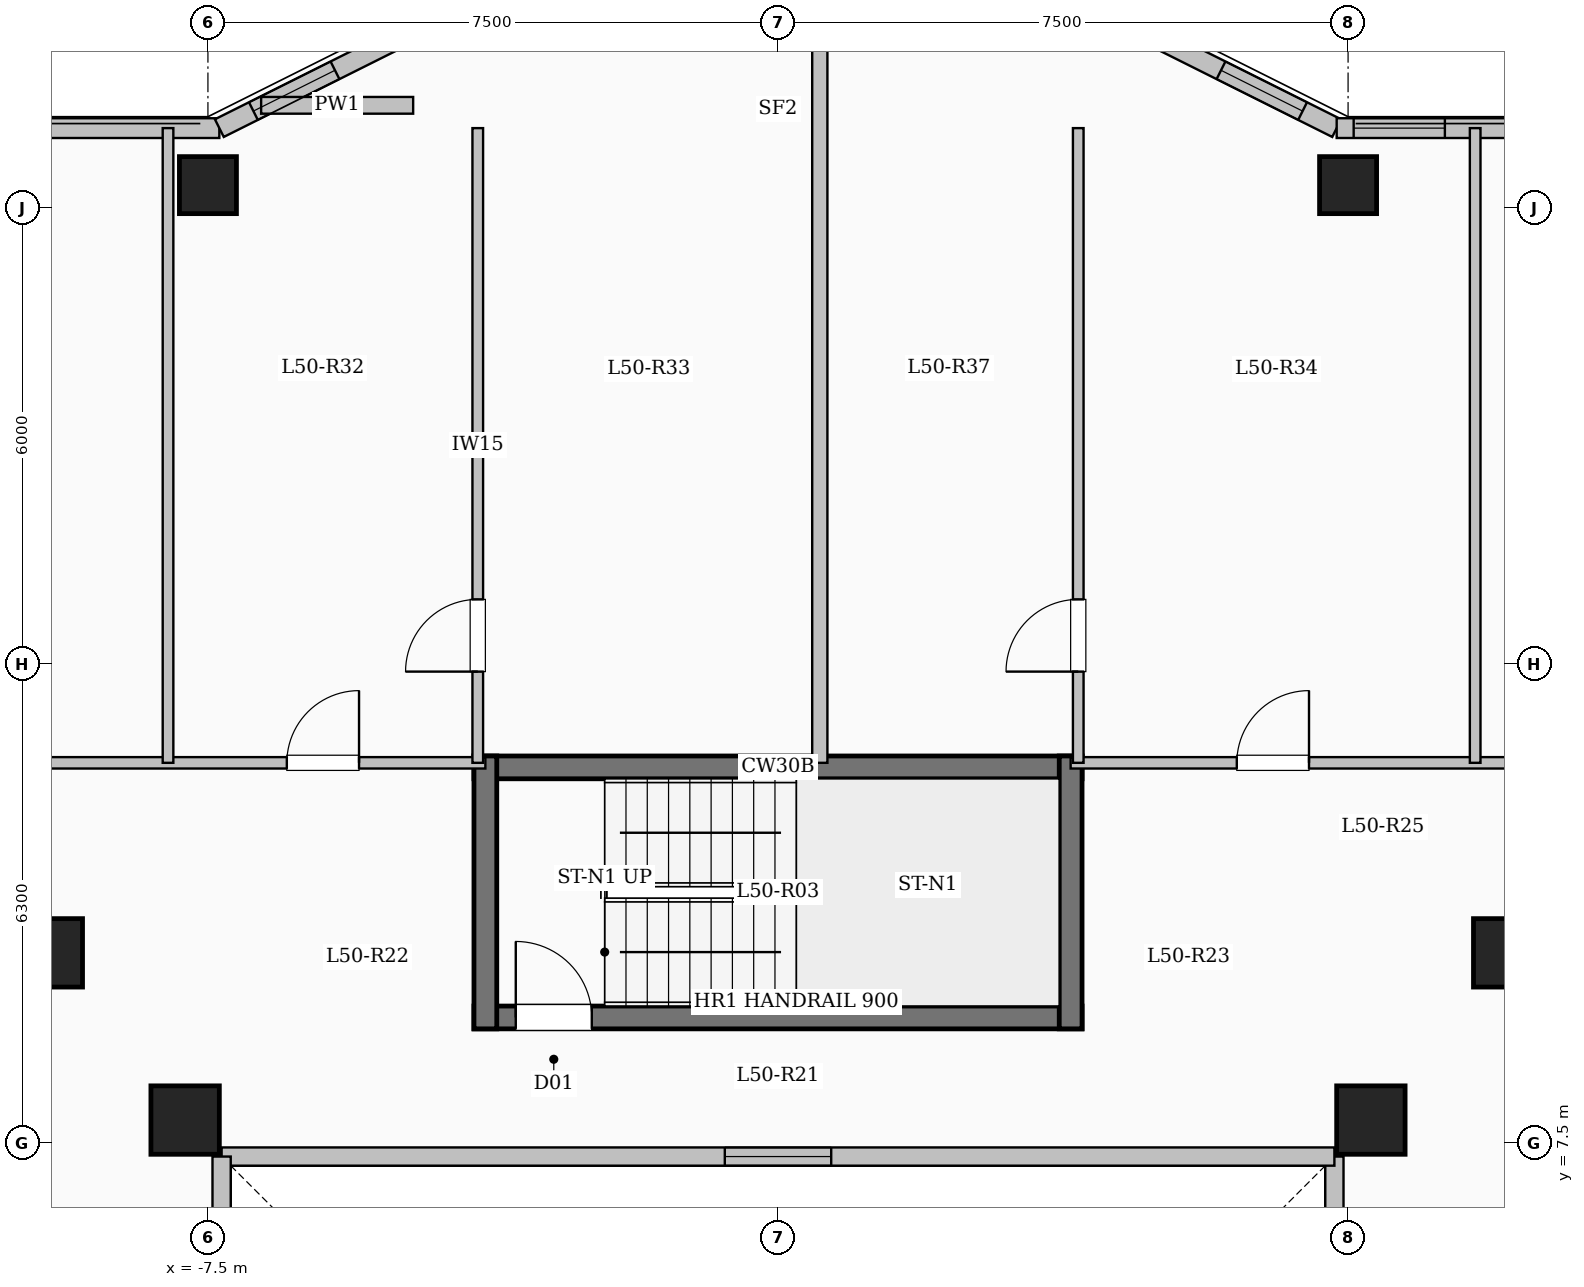
"""IFC4 building model, lengths in metres.
Left out: names, types, materials, properties, quantities, classifications, styles, units other than length and angle.
Written with IfcOpenShell. Run it as: python <this file> out.ifc"""

import sys

from ifc_helpers import new_model, si_unit, direction, frame, frame_2d, origin, origin_2d, place, context, subcontext, project, spatial, rectangle, extrude, element, fill, save


model = new_model("IFC4")
c1 = context("Model", 3, precision=1e-05, world=origin(), true_north=direction((0.0, 1.0)))
c2 = subcontext(c1, "Body", "Model", "MODEL_VIEW")
j1 = project(units=[si_unit("LENGTHUNIT", "METRE"), si_unit("PLANEANGLEUNIT", "RADIAN")], contexts=[c1])
p1 = place(None, origin())
s1 = spatial("IfcSite", under=j1, at=p1, CompositionType="ELEMENT")
p2 = place(p1, origin())
s2 = spatial("IfcBuilding", under=s1, at=p2, CompositionType="ELEMENT")
p3 = place(p2, frame((0.0, 0.0, 186.9)))
s3 = spatial("IfcBuildingStorey", under=s2, at=p3, CompositionType="ELEMENT", Elevation=186.9)
for number, where, z_axis, x_axis in (
    (1, (-7.8, 7.8, 0.0), (0.0, 0.0, 1.0), (1.0, 0.0, 0.0)),
    (2, (7.8, 7.8, 0.0), (0.0, 0.0, 1.0), (1.0, 0.0, 0.0)),
    (3, (-9.6, 10.0, 0.0), (0.0, 0.0, 1.0), (1.0, 0.0, 0.0)),
    (4, (9.6, 10.0, 0.0), (0.0, 0.0, 1.0), (1.0, 0.0, 0.0)),
):
    element("IfcColumn", number, at=place(p3, frame(where, z_axis=z_axis, x_axis=x_axis)), inside=s3, PredefinedType="COLUMN", context=c2, shape_type="SweptSolid", body=[
        extrude(rectangle(XDim=0.9, YDim=0.9, at=origin_2d()), origin(), (0.0, 0.0, 1.0), 3.35),
    ])
for number, where, z_axis, x_axis in (
    (5, (-7.5, 20.1, 0.0), (0.0, 0.0, 1.0), (1.0, 0.0, 0.0)),
    (6, (7.5, 20.1, 0.0), (0.0, 0.0, 1.0), (1.0, 0.0, 0.0)),
):
    element("IfcColumn", number, at=place(p3, frame(where, z_axis=z_axis, x_axis=x_axis)), inside=s3, PredefinedType="COLUMN", context=c2, shape_type="SweptSolid", body=[
        extrude(rectangle(XDim=0.75, YDim=0.75, at=origin_2d()), origin(), (0.0, 0.0, 1.0), 3.35),
    ])
p4 = place(p3, frame((7.32, -7.32, 0.0), z_axis=(0.0, 0.0, 1.0), x_axis=(0.0, 1.0, 0.0)))
e7 = element("IfcWall", 7, at=p4, inside=s3, PredefinedType="SOLIDWALL", context=c2, shape_type="SweptSolid", body=[
    extrude(rectangle(XDim=14.64, YDim=0.24, at=frame_2d((7.32, 0.0))), origin(), (0.0, 0.0, 1.0), 3.1),
])
p5 = place(p4, frame((6.62, 0.0, 0.95)))
e8 = element("IfcOpeningElement", 8, at=p5, cuts=e7, PredefinedType="OPENING", context=c2, shape_type="SweptSolid", body=[
    extrude(rectangle(XDim=1.4, YDim=1.5, at=frame_2d((0.7, 0.75))), frame((0.0, 0.13, 0.0), z_axis=(0.0, -1.0, 0.0), x_axis=(1.0, 0.0, 0.0)), (0.0, 0.0, 1.0), 0.26),
])
p6 = place(p3, frame((7.32, 7.32, 0.0), z_axis=(0.0, 0.0, 1.0), x_axis=(-1.0, 0.0, 0.0)))
e9 = element("IfcWall", 9, at=p6, inside=s3, PredefinedType="SOLIDWALL", context=c2, shape_type="SweptSolid", body=[
    extrude(rectangle(XDim=14.64, YDim=0.24, at=frame_2d((7.32, 0.0))), origin(), (0.0, 0.0, 1.0), 3.1),
])
p7 = place(p6, frame((6.62, 0.0, 0.95)))
e10 = element("IfcOpeningElement", 10, at=p7, cuts=e9, PredefinedType="OPENING", context=c2, shape_type="SweptSolid", body=[
    extrude(rectangle(XDim=1.4, YDim=1.5, at=frame_2d((0.7, 0.75))), frame((0.0, 0.13, 0.0), z_axis=(0.0, -1.0, 0.0), x_axis=(1.0, 0.0, 0.0)), (0.0, 0.0, 1.0), 0.26),
])
p8 = place(p3, frame((-7.32, 7.32, 0.0), z_axis=(0.0, 0.0, 1.0), x_axis=(0.0, -1.0, 0.0)))
e11 = element("IfcWall", 11, at=p8, inside=s3, PredefinedType="SOLIDWALL", context=c2, shape_type="SweptSolid", body=[
    extrude(rectangle(XDim=14.64, YDim=0.24, at=frame_2d((7.32, 0.0))), origin(), (0.0, 0.0, 1.0), 3.1),
])
p9 = place(p8, frame((6.62, 0.0, 0.95)))
e12 = element("IfcOpeningElement", 12, at=p9, cuts=e11, PredefinedType="OPENING", context=c2, shape_type="SweptSolid", body=[
    extrude(rectangle(XDim=1.4, YDim=1.5, at=frame_2d((0.7, 0.75))), frame((0.0, 0.13, 0.0), z_axis=(0.0, -1.0, 0.0), x_axis=(1.0, 0.0, 0.0)), (0.0, 0.0, 1.0), 0.26),
])
p10 = place(p3, frame((-18.45, 20.85, 0.0), z_axis=(0.0, 0.0, 1.0), x_axis=(1.0, 0.0, 0.0)))
e13 = element("IfcWall", 13, at=p10, inside=s3, PredefinedType="SOLIDWALL", context=c2, shape_type="SweptSolid", body=[
    extrude(rectangle(XDim=11.1, YDim=0.26, at=frame_2d((5.55, 0.0))), origin(), (0.0, 0.0, 1.0), 3.1),
])
p11 = place(p10, frame((1.637, 0.0, 0.9)))
e14 = element("IfcOpeningElement", 14, at=p11, cuts=e13, PredefinedType="OPENING", context=c2, shape_type="SweptSolid", body=[
    extrude(rectangle(XDim=2.0, YDim=1.7, at=frame_2d((1.0, 0.85))), frame((0.0, 0.14, 0.0), z_axis=(0.0, -1.0, 0.0), x_axis=(1.0, 0.0, 0.0)), (0.0, 0.0, 1.0), 0.28),
])
p12 = place(p10, frame((6.835, 0.0, 0.9)))
e15 = element("IfcOpeningElement", 15, at=p12, cuts=e13, PredefinedType="OPENING", context=c2, shape_type="SweptSolid", body=[
    extrude(rectangle(XDim=2.0, YDim=1.7, at=frame_2d((1.0, 0.85))), frame((0.0, 0.14, 0.0), z_axis=(0.0, -1.0, 0.0), x_axis=(1.0, 0.0, 0.0)), (0.0, 0.0, 1.0), 0.28),
])
p13 = place(p3, frame((-7.35, 20.85, 0.0), z_axis=(0.0, 0.0, 1.0), x_axis=(0.894427191, 0.4472135955, 0.0)))
e16 = element("IfcWall", 16, at=p13, inside=s3, PredefinedType="SOLIDWALL", context=c2, shape_type="SweptSolid", body=[
    extrude(rectangle(XDim=3.354, YDim=0.26, at=frame_2d((1.677, 0.0))), origin(), (0.0, 0.0, 1.0), 3.1),
])
p14 = place(p13, frame((0.501, 0.0, 0.95)))
e17 = element("IfcOpeningElement", 17, at=p14, cuts=e16, PredefinedType="OPENING", context=c2, shape_type="SweptSolid", body=[
    extrude(rectangle(XDim=1.2, YDim=1.5, at=frame_2d((0.6, 0.75))), frame((0.0, 0.14, 0.0), z_axis=(0.0, -1.0, 0.0), x_axis=(1.0, 0.0, 0.0)), (0.0, 0.0, 1.0), 0.28),
])
p15 = place(p3, frame((4.35, 22.35, 0.0), z_axis=(0.0, 0.0, 1.0), x_axis=(0.894427191, -0.4472135955, 0.0)))
e18 = element("IfcWall", 18, at=p15, inside=s3, PredefinedType="SOLIDWALL", context=c2, shape_type="SweptSolid", body=[
    extrude(rectangle(XDim=3.354, YDim=0.26, at=frame_2d((1.677, 0.0))), origin(), (0.0, 0.0, 1.0), 3.1),
])
p16 = place(p15, frame((1.653, 0.0, 0.95)))
e19 = element("IfcOpeningElement", 19, at=p16, cuts=e18, PredefinedType="OPENING", context=c2, shape_type="SweptSolid", body=[
    extrude(rectangle(XDim=1.2, YDim=1.5, at=frame_2d((0.6, 0.75))), frame((0.0, 0.14, 0.0), z_axis=(0.0, -1.0, 0.0), x_axis=(1.0, 0.0, 0.0)), (0.0, 0.0, 1.0), 0.28),
])
p17 = place(p3, frame((7.35, 20.85, 0.0), z_axis=(0.0, 0.0, 1.0), x_axis=(1.0, 0.0, 0.0)))
e20 = element("IfcWall", 20, at=p17, inside=s3, PredefinedType="SOLIDWALL", context=c2, shape_type="SweptSolid", body=[
    extrude(rectangle(XDim=11.1, YDim=0.26, at=frame_2d((5.55, 0.0))), origin(), (0.0, 0.0, 1.0), 3.1),
])
p18 = place(p17, frame((0.223, 0.0, 0.95)))
e21 = element("IfcOpeningElement", 21, at=p18, cuts=e20, PredefinedType="OPENING", context=c2, shape_type="SweptSolid", body=[
    extrude(rectangle(XDim=1.2, YDim=1.5, at=frame_2d((0.6, 0.75))), frame((0.0, 0.14, 0.0), z_axis=(0.0, -1.0, 0.0), x_axis=(1.0, 0.0, 0.0)), (0.0, 0.0, 1.0), 0.28),
])
p19 = place(p17, frame((3.42, 0.0, 0.9)))
e22 = element("IfcOpeningElement", 22, at=p19, cuts=e20, PredefinedType="OPENING", context=c2, shape_type="SweptSolid", body=[
    extrude(rectangle(XDim=2.0, YDim=1.7, at=frame_2d((1.0, 0.85))), frame((0.0, 0.14, 0.0), z_axis=(0.0, -1.0, 0.0), x_axis=(1.0, 0.0, 0.0)), (0.0, 0.0, 1.0), 0.28),
])
p20 = place(p17, frame((8.041, 0.0, 0.9)))
e23 = element("IfcOpeningElement", 23, at=p20, cuts=e20, PredefinedType="OPENING", context=c2, shape_type="SweptSolid", body=[
    extrude(rectangle(XDim=2.0, YDim=1.7, at=frame_2d((1.0, 0.85))), frame((0.0, 0.14, 0.0), z_axis=(0.0, -1.0, 0.0), x_axis=(1.0, 0.0, 0.0)), (0.0, 0.0, 1.0), 0.28),
])
p21 = place(p3, frame((-6.8, 21.15, 0.0), z_axis=(0.0, 0.0, 1.0), x_axis=(1.0, 0.0, 0.0)))
e24 = element("IfcWall", 24, at=p21, inside=s3, PredefinedType="PARAPET", context=c2, shape_type="SweptSolid", body=[
    extrude(rectangle(XDim=2.0, YDim=0.22, at=frame_2d((1.0, 0.0))), origin(), (0.0, 0.0, 1.0), 0.85),
])
p22 = place(p3, frame((-4.0, 12.44, 0.0), z_axis=(0.0, 0.0, 1.0), x_axis=(1.0, 0.0, 0.0)))
e25 = element("IfcWall", 25, at=p22, inside=s3, PredefinedType="SHEAR", context=c2, shape_type="SweptSolid", body=[
    extrude(rectangle(XDim=8.0, YDim=0.3, at=frame_2d((4.0, 0.0))), origin(), (0.0, 0.0, 1.0), 3.35),
])
p23 = place(p3, frame((-4.0, 9.15, 0.0), z_axis=(0.0, 0.0, 1.0), x_axis=(1.0, 0.0, 0.0)))
e26 = element("IfcWall", 26, at=p23, inside=s3, PredefinedType="SHEAR", context=c2, shape_type="SweptSolid", body=[
    extrude(rectangle(XDim=8.0, YDim=0.3, at=frame_2d((4.0, 0.0))), origin(), (0.0, 0.0, 1.0), 3.35),
])
p24 = place(p23, frame((0.55, 0.0, 0.0)))
e27 = element("IfcOpeningElement", 27, at=p24, cuts=e26, PredefinedType="OPENING", context=c2, shape_type="SweptSolid", body=[
    extrude(rectangle(XDim=1.0, YDim=2.15, at=frame_2d((0.5, 1.075))), frame((0.0, 0.16, 0.0), z_axis=(0.0, -1.0, 0.0), x_axis=(1.0, 0.0, 0.0)), (0.0, 0.0, 1.0), 0.32),
])
for number, where, z_axis, x_axis in (
    (28, (-3.85, 9.0, 0.0), (0.0, 0.0, 1.0), (0.0, 1.0, 0.0)),
    (29, (3.85, 9.0, 0.0), (0.0, 0.0, 1.0), (0.0, 1.0, 0.0)),
):
    element("IfcWall", number, at=place(p3, frame(where, z_axis=z_axis, x_axis=x_axis)), inside=s3, PredefinedType="SHEAR", context=c2, shape_type="SweptSolid", body=[
        extrude(rectangle(XDim=3.59, YDim=0.3, at=frame_2d((1.795, 0.0))), origin(), (0.0, 0.0, 1.0), 3.35),
    ])
p25 = place(p3, frame((-18.35, 12.5, 0.0), z_axis=(0.0, 0.0, 1.0), x_axis=(1.0, 0.0, 0.0)))
e30 = element("IfcWall", 30, at=p25, inside=s3, PredefinedType="PARTITIONING", context=c2, shape_type="SweptSolid", body=[
    extrude(rectangle(XDim=14.5, YDim=0.15, at=frame_2d((7.25, 0.0))), origin(), (0.0, 0.0, 1.0), 3.1),
])
p26 = place(p25, frame((2.076, 0.0, 0.0)))
e31 = element("IfcOpeningElement", 31, at=p26, cuts=e30, PredefinedType="OPENING", context=c2, shape_type="SweptSolid", body=[
    extrude(rectangle(XDim=0.95, YDim=2.15, at=frame_2d((0.475, 1.075))), frame((0.0, 0.085, 0.0), z_axis=(0.0, -1.0, 0.0), x_axis=(1.0, 0.0, 0.0)), (0.0, 0.0, 1.0), 0.17),
])
p27 = place(p25, frame((7.269, 0.0, 0.0)))
e32 = element("IfcOpeningElement", 32, at=p27, cuts=e30, PredefinedType="OPENING", context=c2, shape_type="SweptSolid", body=[
    extrude(rectangle(XDim=0.95, YDim=2.15, at=frame_2d((0.475, 1.075))), frame((0.0, 0.085, 0.0), z_axis=(0.0, -1.0, 0.0), x_axis=(1.0, 0.0, 0.0)), (0.0, 0.0, 1.0), 0.17),
])
p28 = place(p25, frame((11.888, 0.0, 0.0)))
e33 = element("IfcOpeningElement", 33, at=p28, cuts=e30, PredefinedType="OPENING", context=c2, shape_type="SweptSolid", body=[
    extrude(rectangle(XDim=0.95, YDim=2.15, at=frame_2d((0.475, 1.075))), frame((0.0, 0.085, 0.0), z_axis=(0.0, -1.0, 0.0), x_axis=(1.0, 0.0, 0.0)), (0.0, 0.0, 1.0), 0.17),
])
p29 = place(p3, frame((3.85, 12.5, 0.0), z_axis=(0.0, 0.0, 1.0), x_axis=(1.0, 0.0, 0.0)))
e34 = element("IfcWall", 34, at=p29, inside=s3, PredefinedType="PARTITIONING", context=c2, shape_type="SweptSolid", body=[
    extrude(rectangle(XDim=14.5, YDim=0.15, at=frame_2d((7.25, 0.0))), origin(), (0.0, 0.0, 1.0), 3.1),
])
p30 = place(p29, frame((2.186, 0.0, 0.0)))
e35 = element("IfcOpeningElement", 35, at=p30, cuts=e34, PredefinedType="OPENING", context=c2, shape_type="SweptSolid", body=[
    extrude(rectangle(XDim=0.95, YDim=2.15, at=frame_2d((0.475, 1.075))), frame((0.0, 0.085, 0.0), z_axis=(0.0, -1.0, 0.0), x_axis=(1.0, 0.0, 0.0)), (0.0, 0.0, 1.0), 0.17),
])
p31 = place(p29, frame((7.379, 0.0, 0.0)))
e36 = element("IfcOpeningElement", 36, at=p31, cuts=e34, PredefinedType="OPENING", context=c2, shape_type="SweptSolid", body=[
    extrude(rectangle(XDim=0.95, YDim=2.15, at=frame_2d((0.475, 1.075))), frame((0.0, 0.085, 0.0), z_axis=(0.0, -1.0, 0.0), x_axis=(1.0, 0.0, 0.0)), (0.0, 0.0, 1.0), 0.17),
])
p32 = place(p29, frame((11.998, 0.0, 0.0)))
e37 = element("IfcOpeningElement", 37, at=p32, cuts=e34, PredefinedType="OPENING", context=c2, shape_type="SweptSolid", body=[
    extrude(rectangle(XDim=0.95, YDim=2.15, at=frame_2d((0.475, 1.075))), frame((0.0, 0.085, 0.0), z_axis=(0.0, -1.0, 0.0), x_axis=(1.0, 0.0, 0.0)), (0.0, 0.0, 1.0), 0.17),
])
p33 = place(p3, frame((0.55, 12.5, 0.0), z_axis=(0.0, 0.0, 1.0), x_axis=(0.0, 1.0, 0.0)))
e38 = element("IfcWall", 38, at=p33, inside=s3, PredefinedType="SOLIDWALL", context=c2, shape_type="SweptSolid", body=[
    extrude(rectangle(XDim=9.88, YDim=0.2, at=frame_2d((4.94, 0.0))), origin(), (0.0, 0.0, 1.0), 3.1),
])
p34 = place(p3, frame((-3.95, 12.5, 0.0), z_axis=(0.0, 0.0, 1.0), x_axis=(0.0, 1.0, 0.0)))
e39 = element("IfcWall", 39, at=p34, inside=s3, PredefinedType="PARTITIONING", context=c2, shape_type="SweptSolid", body=[
    extrude(rectangle(XDim=8.35, YDim=0.14, at=frame_2d((4.175, 0.0))), origin(), (0.0, 0.0, 1.0), 3.1),
])
p35 = place(p34, frame((1.2, 0.0, 0.0)))
e40 = element("IfcOpeningElement", 40, at=p35, cuts=e39, PredefinedType="OPENING", context=c2, shape_type="SweptSolid", body=[
    extrude(rectangle(XDim=0.95, YDim=2.15, at=frame_2d((0.475, 1.075))), frame((0.0, 0.08, 0.0), z_axis=(0.0, -1.0, 0.0), x_axis=(1.0, 0.0, 0.0)), (0.0, 0.0, 1.0), 0.16),
])
p36 = place(p3, frame((-8.025, 12.5, 0.0), z_axis=(0.0, 0.0, 1.0), x_axis=(0.0, 1.0, 0.0)))
e41 = element("IfcWall", 41, at=p36, inside=s3, PredefinedType="PARTITIONING", context=c2, shape_type="SweptSolid", body=[
    extrude(rectangle(XDim=8.35, YDim=0.14, at=frame_2d((4.175, 0.0))), origin(), (0.0, 0.0, 1.0), 2.585),
])
p37 = place(p3, frame((3.95, 12.5, 0.0), z_axis=(0.0, 0.0, 1.0), x_axis=(0.0, 1.0, 0.0)))
e42 = element("IfcWall", 42, at=p37, inside=s3, PredefinedType="PARTITIONING", context=c2, shape_type="SweptSolid", body=[
    extrude(rectangle(XDim=8.35, YDim=0.14, at=frame_2d((4.175, 0.0))), origin(), (0.0, 0.0, 1.0), 3.1),
])
p38 = place(p37, frame((1.2, 0.0, 0.0)))
e43 = element("IfcOpeningElement", 43, at=p38, cuts=e42, PredefinedType="OPENING", context=c2, shape_type="SweptSolid", body=[
    extrude(rectangle(XDim=0.95, YDim=2.15, at=frame_2d((0.475, 1.075))), frame((0.0, 0.08, 0.0), z_axis=(0.0, -1.0, 0.0), x_axis=(1.0, 0.0, 0.0)), (0.0, 0.0, 1.0), 0.16),
])
p39 = place(p3, frame((9.172, 12.5, 0.0), z_axis=(0.0, 0.0, 1.0), x_axis=(0.0, 1.0, 0.0)))
e44 = element("IfcWall", 44, at=p39, inside=s3, PredefinedType="PARTITIONING", context=c2, shape_type="SweptSolid", body=[
    extrude(rectangle(XDim=8.35, YDim=0.14, at=frame_2d((4.175, 0.0))), origin(), (0.0, 0.0, 1.0), 3.1),
])
p40 = place(p7, origin())
e45 = element("IfcWindow", 45, at=p40, inside=s3, PartitioningType="SINGLE_PANEL", PredefinedType="WINDOW", context=c2, shape_type="SweptSolid", body=[
    extrude(rectangle(XDim=1.4, YDim=1.5, at=frame_2d((0.7, 0.75))), frame((0.0, 0.03, 0.0), z_axis=(0.0, -1.0, 0.0), x_axis=(1.0, 0.0, 0.0)), (0.0, 0.0, 1.0), 0.06),
])
fill(e10, e45)
p41 = place(p14, origin())
e46 = element("IfcWindow", 46, at=p41, inside=s3, PartitioningType="SINGLE_PANEL", PredefinedType="WINDOW", context=c2, shape_type="SweptSolid", body=[
    extrude(rectangle(XDim=1.2, YDim=1.5, at=frame_2d((0.6, 0.75))), frame((0.0, 0.03, 0.0), z_axis=(0.0, -1.0, 0.0), x_axis=(1.0, 0.0, 0.0)), (0.0, 0.0, 1.0), 0.06),
])
fill(e17, e46)
p42 = place(p16, origin())
e47 = element("IfcWindow", 47, at=p42, inside=s3, PartitioningType="SINGLE_PANEL", PredefinedType="WINDOW", context=c2, shape_type="SweptSolid", body=[
    extrude(rectangle(XDim=1.2, YDim=1.5, at=frame_2d((0.6, 0.75))), frame((0.0, 0.03, 0.0), z_axis=(0.0, -1.0, 0.0), x_axis=(1.0, 0.0, 0.0)), (0.0, 0.0, 1.0), 0.06),
])
fill(e19, e47)
p43 = place(p18, origin())
e48 = element("IfcWindow", 48, at=p43, inside=s3, PartitioningType="SINGLE_PANEL", PredefinedType="WINDOW", context=c2, shape_type="SweptSolid", body=[
    extrude(rectangle(XDim=1.2, YDim=1.5, at=frame_2d((0.6, 0.75))), frame((0.0, 0.03, 0.0), z_axis=(0.0, -1.0, 0.0), x_axis=(1.0, 0.0, 0.0)), (0.0, 0.0, 1.0), 0.06),
])
fill(e21, e48)
p44 = place(p24, origin())
e49 = element("IfcDoor", 49, at=p44, inside=s3, OperationType="SINGLE_SWING_LEFT", PredefinedType="DOOR", context=c2, shape_type="SweptSolid", body=[
    extrude(rectangle(XDim=1.0, YDim=2.15, at=frame_2d((0.5, 1.075))), frame((0.0, 0.025, 0.0), z_axis=(0.0, -1.0, 0.0), x_axis=(1.0, 0.0, 0.0)), (0.0, 0.0, 1.0), 0.05),
])
fill(e27, e49)
p45 = place(p28, origin())
e50 = element("IfcDoor", 50, at=p45, inside=s3, OperationType="SINGLE_SWING_RIGHT", PredefinedType="DOOR", context=c2, shape_type="SweptSolid", body=[
    extrude(rectangle(XDim=0.95, YDim=2.15, at=frame_2d((0.475, 1.075))), frame((0.0, 0.025, 0.0), z_axis=(0.0, -1.0, 0.0), x_axis=(1.0, 0.0, 0.0)), (0.0, 0.0, 1.0), 0.05),
])
fill(e33, e50)
p46 = place(p35, origin())
e51 = element("IfcDoor", 51, at=p46, inside=s3, OperationType="SINGLE_SWING_LEFT", PredefinedType="DOOR", context=c2, shape_type="SweptSolid", body=[
    extrude(rectangle(XDim=0.95, YDim=2.15, at=frame_2d((0.475, 1.075))), frame((0.0, 0.025, 0.0), z_axis=(0.0, -1.0, 0.0), x_axis=(1.0, 0.0, 0.0)), (0.0, 0.0, 1.0), 0.05),
])
fill(e40, e51)
p47 = place(p30, origin())
e52 = element("IfcDoor", 52, at=p47, inside=s3, OperationType="SINGLE_SWING_RIGHT", PredefinedType="DOOR", context=c2, shape_type="SweptSolid", body=[
    extrude(rectangle(XDim=0.95, YDim=2.15, at=frame_2d((0.475, 1.075))), frame((0.0, 0.025, 0.0), z_axis=(0.0, -1.0, 0.0), x_axis=(1.0, 0.0, 0.0)), (0.0, 0.0, 1.0), 0.05),
])
fill(e35, e52)
p48 = place(p38, origin())
e53 = element("IfcDoor", 53, at=p48, inside=s3, OperationType="SINGLE_SWING_LEFT", PredefinedType="DOOR", context=c2, shape_type="SweptSolid", body=[
    extrude(rectangle(XDim=0.95, YDim=2.15, at=frame_2d((0.475, 1.075))), frame((0.0, 0.025, 0.0), z_axis=(0.0, -1.0, 0.0), x_axis=(1.0, 0.0, 0.0)), (0.0, 0.0, 1.0), 0.05),
])
fill(e43, e53)
save(model, sys.argv[1])
